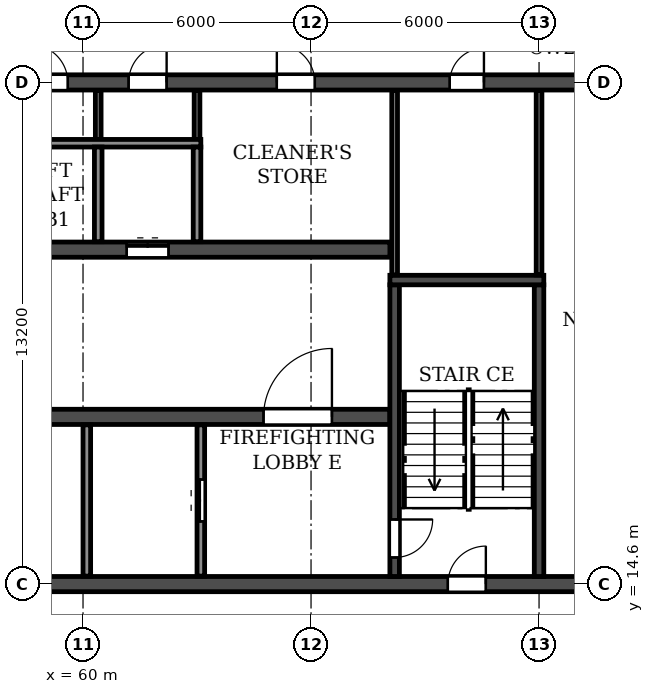
"""IFC4 building model, lengths in metres.
Left out: names, types, materials, properties, quantities, classifications, styles, units other than length and angle.
Written with IfcOpenShell. Run it as: python <this file> out.ifc"""

import sys

from ifc_helpers import new_model, si_unit, direction, frame, frame_2d, origin, place, context, subcontext, project, spatial, rectangle, extrude, element, fill, save


model = new_model("IFC4")
c1 = context("Model", 3, precision=1e-05, world=origin(), true_north=direction((0.0, 1.0)))
c2 = subcontext(c1, "Body", "Model", "MODEL_VIEW")
j1 = project(units=[si_unit("LENGTHUNIT", "METRE"), si_unit("PLANEANGLEUNIT", "RADIAN")], contexts=[c1])
p1 = place(None, origin())
s1 = spatial("IfcSite", under=j1, at=p1, CompositionType="ELEMENT")
p2 = place(p1, origin())
s2 = spatial("IfcBuilding", under=s1, at=p2, CompositionType="ELEMENT")
p3 = place(p2, frame((0.0, 0.0, 208.2)))
s3 = spatial("IfcBuildingStorey", under=s2, at=p3, CompositionType="ELEMENT", Elevation=208.2)
p4 = place(p3, frame((18.2, 14.6, 0.0), z_axis=(0.0, 0.0, 1.0), x_axis=(1.0, 0.0, 0.0)))
e1 = element("IfcWall", 1, at=p4, inside=s3, PredefinedType="SOLIDWALL", context=c2, shape_type="SweptSolid", body=[
    extrude(rectangle(XDim=65.6, YDim=0.4, at=frame_2d((32.8, 0.0))), origin(), (0.0, 0.0, 1.0), 3.0),
])
p5 = place(p4, frame((0.7, 0.0, 0.0)))
e2 = element("IfcOpeningElement", 2, at=p5, cuts=e1, PredefinedType="OPENING", context=c2, shape_type="SweptSolid", body=[
    extrude(rectangle(XDim=1.0, YDim=2.1, at=frame_2d((0.5, 1.05))), frame((0.0, 0.21, 0.0), z_axis=(0.0, -1.0, 0.0), x_axis=(1.0, 0.0, 0.0)), (0.0, 0.0, 1.0), 0.42),
])
p6 = place(p4, frame((8.6, 0.0, 0.0)))
e3 = element("IfcOpeningElement", 3, at=p6, cuts=e1, PredefinedType="OPENING", context=c2, shape_type="SweptSolid", body=[
    extrude(rectangle(XDim=1.0, YDim=2.1, at=frame_2d((0.5, 1.05))), frame((0.0, 0.21, 0.0), z_axis=(0.0, -1.0, 0.0), x_axis=(1.0, 0.0, 0.0)), (0.0, 0.0, 1.0), 0.42),
])
p7 = place(p4, frame((13.2, 0.0, 0.0)))
e4 = element("IfcOpeningElement", 4, at=p7, cuts=e1, PredefinedType="OPENING", context=c2, shape_type="SweptSolid", body=[
    extrude(rectangle(XDim=1.0, YDim=2.1, at=frame_2d((0.5, 1.05))), frame((0.0, 0.21, 0.0), z_axis=(0.0, -1.0, 0.0), x_axis=(1.0, 0.0, 0.0)), (0.0, 0.0, 1.0), 0.42),
])
p8 = place(p4, frame((27.1, 0.0, 0.0)))
e5 = element("IfcOpeningElement", 5, at=p8, cuts=e1, PredefinedType="OPENING", context=c2, shape_type="SweptSolid", body=[
    extrude(rectangle(XDim=1.0, YDim=2.1, at=frame_2d((0.5, 1.05))), frame((0.0, 0.21, 0.0), z_axis=(0.0, -1.0, 0.0), x_axis=(1.0, 0.0, 0.0)), (0.0, 0.0, 1.0), 0.42),
])
p9 = place(p4, frame((32.3, 0.0, 0.0)))
e6 = element("IfcOpeningElement", 6, at=p9, cuts=e1, PredefinedType="OPENING", context=c2, shape_type="SweptSolid", body=[
    extrude(rectangle(XDim=1.0, YDim=2.1, at=frame_2d((0.5, 1.05))), frame((0.0, 0.21, 0.0), z_axis=(0.0, -1.0, 0.0), x_axis=(1.0, 0.0, 0.0)), (0.0, 0.0, 1.0), 0.42),
])
p10 = place(p4, frame((34.9, 0.0, 0.0)))
e7 = element("IfcOpeningElement", 7, at=p10, cuts=e1, PredefinedType="OPENING", context=c2, shape_type="SweptSolid", body=[
    extrude(rectangle(XDim=1.0, YDim=2.1, at=frame_2d((0.5, 1.05))), frame((0.0, 0.21, 0.0), z_axis=(0.0, -1.0, 0.0), x_axis=(1.0, 0.0, 0.0)), (0.0, 0.0, 1.0), 0.42),
])
p11 = place(p4, frame((38.8, 0.0, 0.0)))
e8 = element("IfcOpeningElement", 8, at=p11, cuts=e1, PredefinedType="OPENING", context=c2, shape_type="SweptSolid", body=[
    extrude(rectangle(XDim=1.0, YDim=2.1, at=frame_2d((0.5, 1.05))), frame((0.0, 0.21, 0.0), z_axis=(0.0, -1.0, 0.0), x_axis=(1.0, 0.0, 0.0)), (0.0, 0.0, 1.0), 0.42),
])
p12 = place(p4, frame((51.4, 0.0, 0.0)))
e9 = element("IfcOpeningElement", 9, at=p12, cuts=e1, PredefinedType="OPENING", context=c2, shape_type="SweptSolid", body=[
    extrude(rectangle(XDim=1.0, YDim=2.1, at=frame_2d((0.5, 1.05))), frame((0.0, 0.21, 0.0), z_axis=(0.0, -1.0, 0.0), x_axis=(1.0, 0.0, 0.0)), (0.0, 0.0, 1.0), 0.42),
])
p13 = place(p4, frame((56.0, 0.0, 0.0)))
e10 = element("IfcOpeningElement", 10, at=p13, cuts=e1, PredefinedType="OPENING", context=c2, shape_type="SweptSolid", body=[
    extrude(rectangle(XDim=1.0, YDim=2.1, at=frame_2d((0.5, 1.05))), frame((0.0, 0.21, 0.0), z_axis=(0.0, -1.0, 0.0), x_axis=(1.0, 0.0, 0.0)), (0.0, 0.0, 1.0), 0.42),
])
p14 = place(p4, frame((63.9, 0.0, 0.0)))
e11 = element("IfcOpeningElement", 11, at=p14, cuts=e1, PredefinedType="OPENING", context=c2, shape_type="SweptSolid", body=[
    extrude(rectangle(XDim=1.0, YDim=2.1, at=frame_2d((0.5, 1.05))), frame((0.0, 0.21, 0.0), z_axis=(0.0, -1.0, 0.0), x_axis=(1.0, 0.0, 0.0)), (0.0, 0.0, 1.0), 0.42),
])
p15 = place(p3, frame((18.2, 27.8, 0.0), z_axis=(0.0, 0.0, 1.0), x_axis=(1.0, 0.0, 0.0)))
e12 = element("IfcWall", 12, at=p15, inside=s3, PredefinedType="SOLIDWALL", context=c2, shape_type="SweptSolid", body=[
    extrude(rectangle(XDim=65.6, YDim=0.4, at=frame_2d((32.8, 0.0))), origin(), (0.0, 0.0, 1.0), 3.0),
])
p16 = place(p15, frame((0.7, 0.0, 0.0)))
e13 = element("IfcOpeningElement", 13, at=p16, cuts=e12, PredefinedType="OPENING", context=c2, shape_type="SweptSolid", body=[
    extrude(rectangle(XDim=1.0, YDim=2.1, at=frame_2d((0.5, 1.05))), frame((0.0, 0.21, 0.0), z_axis=(0.0, -1.0, 0.0), x_axis=(1.0, 0.0, 0.0)), (0.0, 0.0, 1.0), 0.42),
])
p17 = place(p15, frame((4.05, 0.0, 0.0)))
e14 = element("IfcOpeningElement", 14, at=p17, cuts=e12, PredefinedType="OPENING", context=c2, shape_type="SweptSolid", body=[
    extrude(rectangle(XDim=0.9, YDim=2.1, at=frame_2d((0.45, 1.05))), frame((0.0, 0.21, 0.0), z_axis=(0.0, -1.0, 0.0), x_axis=(1.0, 0.0, 0.0)), (0.0, 0.0, 1.0), 0.42),
])
p18 = place(p15, frame((13.25, 0.0, 0.0)))
e15 = element("IfcOpeningElement", 15, at=p18, cuts=e12, PredefinedType="OPENING", context=c2, shape_type="SweptSolid", body=[
    extrude(rectangle(XDim=0.9, YDim=2.1, at=frame_2d((0.45, 1.05))), frame((0.0, 0.21, 0.0), z_axis=(0.0, -1.0, 0.0), x_axis=(1.0, 0.0, 0.0)), (0.0, 0.0, 1.0), 0.42),
])
p19 = place(p15, frame((17.7, 0.0, 0.0)))
e16 = element("IfcOpeningElement", 16, at=p19, cuts=e12, PredefinedType="OPENING", context=c2, shape_type="SweptSolid", body=[
    extrude(rectangle(XDim=1.0, YDim=2.1, at=frame_2d((0.5, 1.05))), frame((0.0, 0.21, 0.0), z_axis=(0.0, -1.0, 0.0), x_axis=(1.0, 0.0, 0.0)), (0.0, 0.0, 1.0), 0.42),
])
p20 = place(p15, frame((22.9, 0.0, 0.0)))
e17 = element("IfcOpeningElement", 17, at=p20, cuts=e12, PredefinedType="OPENING", context=c2, shape_type="SweptSolid", body=[
    extrude(rectangle(XDim=1.0, YDim=2.1, at=frame_2d((0.5, 1.05))), frame((0.0, 0.21, 0.0), z_axis=(0.0, -1.0, 0.0), x_axis=(1.0, 0.0, 0.0)), (0.0, 0.0, 1.0), 0.42),
])
p21 = place(p15, frame((29.4, 0.0, 0.0)))
e18 = element("IfcOpeningElement", 18, at=p21, cuts=e12, PredefinedType="OPENING", context=c2, shape_type="SweptSolid", body=[
    extrude(rectangle(XDim=1.0, YDim=2.1, at=frame_2d((0.5, 1.05))), frame((0.0, 0.21, 0.0), z_axis=(0.0, -1.0, 0.0), x_axis=(1.0, 0.0, 0.0)), (0.0, 0.0, 1.0), 0.42),
])
p22 = place(p15, frame((32.3, 0.0, 0.0)))
e19 = element("IfcOpeningElement", 19, at=p22, cuts=e12, PredefinedType="OPENING", context=c2, shape_type="SweptSolid", body=[
    extrude(rectangle(XDim=1.0, YDim=2.1, at=frame_2d((0.5, 1.05))), frame((0.0, 0.21, 0.0), z_axis=(0.0, -1.0, 0.0), x_axis=(1.0, 0.0, 0.0)), (0.0, 0.0, 1.0), 0.42),
])
p23 = place(p15, frame((35.2, 0.0, 0.0)))
e20 = element("IfcOpeningElement", 20, at=p23, cuts=e12, PredefinedType="OPENING", context=c2, shape_type="SweptSolid", body=[
    extrude(rectangle(XDim=1.0, YDim=2.1, at=frame_2d((0.5, 1.05))), frame((0.0, 0.21, 0.0), z_axis=(0.0, -1.0, 0.0), x_axis=(1.0, 0.0, 0.0)), (0.0, 0.0, 1.0), 0.42),
])
p24 = place(p15, frame((37.8, 0.0, 0.0)))
e21 = element("IfcOpeningElement", 21, at=p24, cuts=e12, PredefinedType="OPENING", context=c2, shape_type="SweptSolid", body=[
    extrude(rectangle(XDim=1.0, YDim=2.1, at=frame_2d((0.5, 1.05))), frame((0.0, 0.21, 0.0), z_axis=(0.0, -1.0, 0.0), x_axis=(1.0, 0.0, 0.0)), (0.0, 0.0, 1.0), 0.42),
])
p25 = place(p15, frame((40.4, 0.0, 0.0)))
e22 = element("IfcOpeningElement", 22, at=p25, cuts=e12, PredefinedType="OPENING", context=c2, shape_type="SweptSolid", body=[
    extrude(rectangle(XDim=1.0, YDim=2.1, at=frame_2d((0.5, 1.05))), frame((0.0, 0.21, 0.0), z_axis=(0.0, -1.0, 0.0), x_axis=(1.0, 0.0, 0.0)), (0.0, 0.0, 1.0), 0.42),
])
p26 = place(p15, frame((43.0, 0.0, 0.0)))
e23 = element("IfcOpeningElement", 23, at=p26, cuts=e12, PredefinedType="OPENING", context=c2, shape_type="SweptSolid", body=[
    extrude(rectangle(XDim=1.0, YDim=2.1, at=frame_2d((0.5, 1.05))), frame((0.0, 0.21, 0.0), z_axis=(0.0, -1.0, 0.0), x_axis=(1.0, 0.0, 0.0)), (0.0, 0.0, 1.0), 0.42),
])
p27 = place(p15, frame((46.9, 0.0, 0.0)))
e24 = element("IfcOpeningElement", 24, at=p27, cuts=e12, PredefinedType="OPENING", context=c2, shape_type="SweptSolid", body=[
    extrude(rectangle(XDim=1.0, YDim=2.1, at=frame_2d((0.5, 1.05))), frame((0.0, 0.21, 0.0), z_axis=(0.0, -1.0, 0.0), x_axis=(1.0, 0.0, 0.0)), (0.0, 0.0, 1.0), 0.42),
])
p28 = place(p15, frame((51.45, 0.0, 0.0)))
e25 = element("IfcOpeningElement", 25, at=p28, cuts=e12, PredefinedType="OPENING", context=c2, shape_type="SweptSolid", body=[
    extrude(rectangle(XDim=0.9, YDim=2.1, at=frame_2d((0.45, 1.05))), frame((0.0, 0.21, 0.0), z_axis=(0.0, -1.0, 0.0), x_axis=(1.0, 0.0, 0.0)), (0.0, 0.0, 1.0), 0.42),
])
p29 = place(p15, frame((60.65, 0.0, 0.0)))
e26 = element("IfcOpeningElement", 26, at=p29, cuts=e12, PredefinedType="OPENING", context=c2, shape_type="SweptSolid", body=[
    extrude(rectangle(XDim=0.9, YDim=2.1, at=frame_2d((0.45, 1.05))), frame((0.0, 0.21, 0.0), z_axis=(0.0, -1.0, 0.0), x_axis=(1.0, 0.0, 0.0)), (0.0, 0.0, 1.0), 0.42),
])
p30 = place(p15, frame((63.9, 0.0, 0.0)))
e27 = element("IfcOpeningElement", 27, at=p30, cuts=e12, PredefinedType="OPENING", context=c2, shape_type="SweptSolid", body=[
    extrude(rectangle(XDim=1.0, YDim=2.1, at=frame_2d((0.5, 1.05))), frame((0.0, 0.21, 0.0), z_axis=(0.0, -1.0, 0.0), x_axis=(1.0, 0.0, 0.0)), (0.0, 0.0, 1.0), 0.42),
])
p31 = place(p3, frame((33.925, 19.0, 0.0), z_axis=(0.0, 0.0, 1.0), x_axis=(1.0, 0.0, 0.0)))
e28 = element("IfcWall", 28, at=p31, inside=s3, PredefinedType="SOLIDWALL", context=c2, shape_type="SweptSolid", body=[
    extrude(rectangle(XDim=34.15, YDim=0.4, at=frame_2d((17.075, 0.0))), origin(), (0.0, 0.0, 1.0), 3.0),
])
p32 = place(p31, frame((16.175, 0.0, 0.0)))
e29 = element("IfcOpeningElement", 29, at=p32, cuts=e28, PredefinedType="OPENING", context=c2, shape_type="SweptSolid", body=[
    extrude(rectangle(XDim=1.8, YDim=2.1, at=frame_2d((0.9, 1.05))), frame((0.0, 0.21, 0.0), z_axis=(0.0, -1.0, 0.0), x_axis=(1.0, 0.0, 0.0)), (0.0, 0.0, 1.0), 0.42),
])
p33 = place(p31, frame((1.525, 0.0, 0.0)))
e30 = element("IfcOpeningElement", 30, at=p33, cuts=e28, PredefinedType="OPENING", context=c2, shape_type="SweptSolid", body=[
    extrude(rectangle(XDim=1.8, YDim=2.1, at=frame_2d((0.9, 1.05))), frame((0.0, 0.21, 0.0), z_axis=(0.0, -1.0, 0.0), x_axis=(1.0, 0.0, 0.0)), (0.0, 0.0, 1.0), 0.42),
])
p34 = place(p31, frame((30.825, 0.0, 0.0)))
e31 = element("IfcOpeningElement", 31, at=p34, cuts=e28, PredefinedType="OPENING", context=c2, shape_type="SweptSolid", body=[
    extrude(rectangle(XDim=1.8, YDim=2.1, at=frame_2d((0.9, 1.05))), frame((0.0, 0.21, 0.0), z_axis=(0.0, -1.0, 0.0), x_axis=(1.0, 0.0, 0.0)), (0.0, 0.0, 1.0), 0.42),
])
p35 = place(p3, frame((33.925, 23.4, 0.0), z_axis=(0.0, 0.0, 1.0), x_axis=(1.0, 0.0, 0.0)))
e32 = element("IfcWall", 32, at=p35, inside=s3, PredefinedType="SOLIDWALL", context=c2, shape_type="SweptSolid", body=[
    extrude(rectangle(XDim=34.15, YDim=0.4, at=frame_2d((17.075, 0.0))), origin(), (0.0, 0.0, 1.0), 3.0),
])
p36 = place(p35, frame((16.175, 0.0, 0.0)))
e33 = element("IfcOpeningElement", 33, at=p36, cuts=e32, PredefinedType="OPENING", context=c2, shape_type="SweptSolid", body=[
    extrude(rectangle(XDim=1.8, YDim=2.1, at=frame_2d((0.9, 1.05))), frame((0.0, 0.21, 0.0), z_axis=(0.0, -1.0, 0.0), x_axis=(1.0, 0.0, 0.0)), (0.0, 0.0, 1.0), 0.42),
])
p37 = place(p35, frame((0.625, 0.0, 0.0)))
e34 = element("IfcOpeningElement", 34, at=p37, cuts=e32, PredefinedType="OPENING", context=c2, shape_type="SweptSolid", body=[
    extrude(rectangle(XDim=1.1, YDim=2.1, at=frame_2d((0.55, 1.05))), frame((0.0, 0.21, 0.0), z_axis=(0.0, -1.0, 0.0), x_axis=(1.0, 0.0, 0.0)), (0.0, 0.0, 1.0), 0.42),
])
p38 = place(p35, frame((3.225, 0.0, 0.0)))
e35 = element("IfcOpeningElement", 35, at=p38, cuts=e32, PredefinedType="OPENING", context=c2, shape_type="SweptSolid", body=[
    extrude(rectangle(XDim=1.1, YDim=2.1, at=frame_2d((0.55, 1.05))), frame((0.0, 0.21, 0.0), z_axis=(0.0, -1.0, 0.0), x_axis=(1.0, 0.0, 0.0)), (0.0, 0.0, 1.0), 0.42),
])
p39 = place(p35, frame((5.825, 0.0, 0.0)))
e36 = element("IfcOpeningElement", 36, at=p39, cuts=e32, PredefinedType="OPENING", context=c2, shape_type="SweptSolid", body=[
    extrude(rectangle(XDim=1.1, YDim=2.1, at=frame_2d((0.55, 1.05))), frame((0.0, 0.21, 0.0), z_axis=(0.0, -1.0, 0.0), x_axis=(1.0, 0.0, 0.0)), (0.0, 0.0, 1.0), 0.42),
])
p40 = place(p35, frame((8.425, 0.0, 0.0)))
e37 = element("IfcOpeningElement", 37, at=p40, cuts=e32, PredefinedType="OPENING", context=c2, shape_type="SweptSolid", body=[
    extrude(rectangle(XDim=1.1, YDim=2.1, at=frame_2d((0.55, 1.05))), frame((0.0, 0.21, 0.0), z_axis=(0.0, -1.0, 0.0), x_axis=(1.0, 0.0, 0.0)), (0.0, 0.0, 1.0), 0.42),
])
p41 = place(p35, frame((11.025, 0.0, 0.0)))
e38 = element("IfcOpeningElement", 38, at=p41, cuts=e32, PredefinedType="OPENING", context=c2, shape_type="SweptSolid", body=[
    extrude(rectangle(XDim=1.1, YDim=2.1, at=frame_2d((0.55, 1.05))), frame((0.0, 0.21, 0.0), z_axis=(0.0, -1.0, 0.0), x_axis=(1.0, 0.0, 0.0)), (0.0, 0.0, 1.0), 0.42),
])
p42 = place(p35, frame((13.625, 0.0, 0.0)))
e39 = element("IfcOpeningElement", 39, at=p42, cuts=e32, PredefinedType="OPENING", context=c2, shape_type="SweptSolid", body=[
    extrude(rectangle(XDim=1.1, YDim=2.1, at=frame_2d((0.55, 1.05))), frame((0.0, 0.21, 0.0), z_axis=(0.0, -1.0, 0.0), x_axis=(1.0, 0.0, 0.0)), (0.0, 0.0, 1.0), 0.42),
])
p43 = place(p35, frame((27.225, 0.0, 0.0)))
e40 = element("IfcOpeningElement", 40, at=p43, cuts=e32, PredefinedType="OPENING", context=c2, shape_type="SweptSolid", body=[
    extrude(rectangle(XDim=1.1, YDim=2.1, at=frame_2d((0.55, 1.05))), frame((0.0, 0.21, 0.0), z_axis=(0.0, -1.0, 0.0), x_axis=(1.0, 0.0, 0.0)), (0.0, 0.0, 1.0), 0.42),
])
p44 = place(p3, frame((68.2, 14.8, 0.0), z_axis=(0.0, 0.0, 1.0), x_axis=(0.0, 1.0, 0.0)))
e41 = element("IfcWall", 41, at=p44, inside=s3, PredefinedType="SOLIDWALL", context=c2, shape_type="SweptSolid", body=[
    extrude(rectangle(XDim=7.675, YDim=0.25, at=frame_2d((3.837, 0.0))), origin(), (0.0, 0.0, 1.0), 3.0),
])
p45 = place(p44, frame((0.5, 0.0, 0.0)))
e42 = element("IfcOpeningElement", 42, at=p45, cuts=e41, PredefinedType="OPENING", context=c2, shape_type="SweptSolid", body=[
    extrude(rectangle(XDim=1.0, YDim=2.1, at=frame_2d((0.5, 1.05))), frame((0.0, 0.135, 0.0), z_axis=(0.0, -1.0, 0.0), x_axis=(1.0, 0.0, 0.0)), (0.0, 0.0, 1.0), 0.27),
])
p46 = place(p3, frame((72.0, 14.8, 0.0), z_axis=(0.0, 0.0, 1.0), x_axis=(0.0, 1.0, 0.0)))
e43 = element("IfcWall", 43, at=p46, inside=s3, PredefinedType="SOLIDWALL", context=c2, shape_type="SweptSolid", body=[
    extrude(rectangle(XDim=7.675, YDim=0.25, at=frame_2d((3.837, 0.0))), origin(), (0.0, 0.0, 1.0), 3.0),
])
p47 = place(p3, frame((68.075, 22.6, 0.0), z_axis=(0.0, 0.0, 1.0), x_axis=(1.0, 0.0, 0.0)))
e44 = element("IfcWall", 44, at=p47, inside=s3, PredefinedType="SOLIDWALL", context=c2, shape_type="SweptSolid", body=[
    extrude(rectangle(XDim=4.05, YDim=0.25, at=frame_2d((2.025, 0.0))), origin(), (0.0, 0.0, 1.0), 3.0),
])
for number, where, z_axis, x_axis in (
    (45, (60.4, 26.3, 0.0), (0.0, 0.0, 1.0), (0.0, 1.0, 0.0)),
    (46, (63.0, 26.3, 0.0), (0.0, 0.0, 1.0), (0.0, 1.0, 0.0)),
):
    element("IfcWall", number, at=place(p3, frame(where, z_axis=z_axis, x_axis=x_axis)), inside=s3, PredefinedType="PARTITIONING", context=c2, shape_type="SweptSolid", body=[
        extrude(rectangle(XDim=1.29, YDim=0.15, at=frame_2d((0.645, 0.0))), origin(), (0.0, 0.0, 1.0), 3.0),
    ])
for number, where, z_axis, x_axis in (
    (47, (68.2, 22.735, 0.0), (0.0, 0.0, 1.0), (0.0, 1.0, 0.0)),
    (48, (72.0, 22.735, 0.0), (0.0, 0.0, 1.0), (0.0, 1.0, 0.0)),
):
    element("IfcWall", number, at=place(p3, frame(where, z_axis=z_axis, x_axis=x_axis)), inside=s3, PredefinedType="PARTITIONING", context=c2, shape_type="SweptSolid", body=[
        extrude(rectangle(XDim=4.855, YDim=0.15, at=frame_2d((2.427, 0.0))), origin(), (0.0, 0.0, 1.0), 3.0),
    ])
p48 = place(p3, frame((57.7, 26.2, 0.0), z_axis=(0.0, 0.0, 1.0), x_axis=(1.0, 0.0, 0.0)))
e49 = element("IfcWall", 49, at=p48, inside=s3, PredefinedType="PARTITIONING", context=c2, shape_type="SweptSolid", body=[
    extrude(rectangle(XDim=5.4, YDim=0.2, at=frame_2d((2.7, 0.0))), origin(), (0.0, 0.0, 1.0), 3.0),
])
p49 = place(p3, frame((60.1, 14.81, 0.0), z_axis=(0.0, 0.0, 1.0), x_axis=(0.0, 1.0, 0.0)))
e50 = element("IfcWall", 50, at=p49, inside=s3, PredefinedType="PARTITIONING", context=c2, shape_type="SweptSolid", body=[
    extrude(rectangle(XDim=3.98, YDim=0.2, at=frame_2d((1.99, 0.0))), origin(), (0.0, 0.0, 1.0), 3.0),
])
for number, where, z_axis, x_axis in (
    (51, (60.4, 23.61, 0.0), (0.0, 0.0, 1.0), (0.0, 1.0, 0.0)),
    (52, (63.0, 23.61, 0.0), (0.0, 0.0, 1.0), (0.0, 1.0, 0.0)),
):
    element("IfcWall", number, at=place(p3, frame(where, z_axis=z_axis, x_axis=x_axis)), inside=s3, PredefinedType="PARTITIONING", context=c2, shape_type="SweptSolid", body=[
        extrude(rectangle(XDim=2.49, YDim=0.2, at=frame_2d((1.245, 0.0))), origin(), (0.0, 0.0, 1.0), 3.0),
    ])
p50 = place(p3, frame((63.1, 14.81, 0.0), z_axis=(0.0, 0.0, 1.0), x_axis=(0.0, 1.0, 0.0)))
e53 = element("IfcWall", 53, at=p50, inside=s3, PredefinedType="PARTITIONING", context=c2, shape_type="SweptSolid", body=[
    extrude(rectangle(XDim=3.98, YDim=0.2, at=frame_2d((1.99, 0.0))), origin(), (0.0, 0.0, 1.0), 3.0),
])
p51 = place(p50, frame((1.44, 0.0, 0.0)))
e54 = element("IfcOpeningElement", 54, at=p51, cuts=e53, PredefinedType="OPENING", context=c2, shape_type="SweptSolid", body=[
    extrude(rectangle(XDim=1.1, YDim=2.1, at=frame_2d((0.55, 1.05))), frame((0.0, 0.11, 0.0), z_axis=(0.0, -1.0, 0.0), x_axis=(1.0, 0.0, 0.0)), (0.0, 0.0, 1.0), 0.22),
])
p52 = place(p25, origin())
e55 = element("IfcDoor", 55, at=p52, inside=s3, OperationType="SINGLE_SWING_LEFT", PredefinedType="DOOR", context=c2, shape_type="SweptSolid", body=[
    extrude(rectangle(XDim=1.0, YDim=2.1, at=frame_2d((0.5, 1.05))), frame((0.0, 0.025, 0.0), z_axis=(0.0, -1.0, 0.0), x_axis=(1.0, 0.0, 0.0)), (0.0, 0.0, 1.0), 0.05),
])
fill(e22, e55)
p53 = place(p26, origin())
e56 = element("IfcDoor", 56, at=p53, inside=s3, OperationType="SINGLE_SWING_RIGHT", PredefinedType="DOOR", context=c2, shape_type="SweptSolid", body=[
    extrude(rectangle(XDim=1.0, YDim=2.1, at=frame_2d((0.5, 1.05))), frame((0.0, 0.025, 0.0), z_axis=(0.0, -1.0, 0.0), x_axis=(1.0, 0.0, 0.0)), (0.0, 0.0, 1.0), 0.05),
])
fill(e23, e56)
p54 = place(p27, origin())
e57 = element("IfcDoor", 57, at=p54, inside=s3, OperationType="SINGLE_SWING_LEFT", PredefinedType="DOOR", context=c2, shape_type="SweptSolid", body=[
    extrude(rectangle(XDim=1.0, YDim=2.1, at=frame_2d((0.5, 1.05))), frame((0.0, 0.025, 0.0), z_axis=(0.0, -1.0, 0.0), x_axis=(1.0, 0.0, 0.0)), (0.0, 0.0, 1.0), 0.05),
])
fill(e24, e57)
p55 = place(p28, origin())
e58 = element("IfcDoor", 58, at=p55, inside=s3, OperationType="SINGLE_SWING_RIGHT", PredefinedType="DOOR", context=c2, shape_type="SweptSolid", body=[
    extrude(rectangle(XDim=0.9, YDim=2.1, at=frame_2d((0.45, 1.05))), frame((0.0, 0.025, 0.0), z_axis=(0.0, -1.0, 0.0), x_axis=(1.0, 0.0, 0.0)), (0.0, 0.0, 1.0), 0.05),
])
fill(e25, e58)
p56 = place(p12, origin())
e59 = element("IfcDoor", 59, at=p56, inside=s3, OperationType="SINGLE_SWING_RIGHT", PredefinedType="DOOR", context=c2, shape_type="SweptSolid", body=[
    extrude(rectangle(XDim=1.0, YDim=2.1, at=frame_2d((0.5, 1.05))), frame((0.0, 0.025, 0.0), z_axis=(0.0, -1.0, 0.0), x_axis=(1.0, 0.0, 0.0)), (0.0, 0.0, 1.0), 0.05),
])
fill(e9, e59)
p57 = place(p51, origin())
e60 = element("IfcDoor", 60, at=p57, inside=s3, OperationType="DOUBLE_DOOR_SLIDING", PredefinedType="DOOR", context=c2, shape_type="SweptSolid", body=[
    extrude(rectangle(XDim=1.1, YDim=2.1, at=frame_2d((0.55, 1.05))), frame((0.0, 0.025, 0.0), z_axis=(0.0, -1.0, 0.0), x_axis=(1.0, 0.0, 0.0)), (0.0, 0.0, 1.0), 0.05),
])
fill(e54, e60)
p58 = place(p45, frame((1.0, 0.0, 0.0), z_axis=(0.0, 0.0, 1.0), x_axis=(-1.0, 0.0, 0.0)))
e61 = element("IfcDoor", 61, at=p58, inside=s3, OperationType="SINGLE_SWING_LEFT", PredefinedType="DOOR", context=c2, shape_type="SweptSolid", body=[
    extrude(rectangle(XDim=1.0, YDim=2.1, at=frame_2d((0.5, 1.05))), frame((0.0, 0.025, 0.0), z_axis=(0.0, -1.0, 0.0), x_axis=(1.0, 0.0, 0.0)), (0.0, 0.0, 1.0), 0.05),
])
fill(e42, e61)
p59 = place(p43, origin())
e62 = element("IfcDoor", 62, at=p59, inside=s3, OperationType="DOUBLE_DOOR_SLIDING", PredefinedType="DOOR", context=c2, shape_type="SweptSolid", body=[
    extrude(rectangle(XDim=1.1, YDim=2.1, at=frame_2d((0.55, 1.05))), frame((0.0, 0.025, 0.0), z_axis=(0.0, -1.0, 0.0), x_axis=(1.0, 0.0, 0.0)), (0.0, 0.0, 1.0), 0.05),
])
fill(e40, e62)
p60 = place(p34, origin())
e63 = element("IfcDoor", 63, at=p60, inside=s3, OperationType="DOUBLE_DOOR_SINGLE_SWING", PredefinedType="DOOR", context=c2, shape_type="SweptSolid", body=[
    extrude(rectangle(XDim=1.8, YDim=2.1, at=frame_2d((0.9, 1.05))), frame((0.0, 0.025, 0.0), z_axis=(0.0, -1.0, 0.0), x_axis=(1.0, 0.0, 0.0)), (0.0, 0.0, 1.0), 0.05),
])
fill(e31, e63)
save(model, sys.argv[1])
